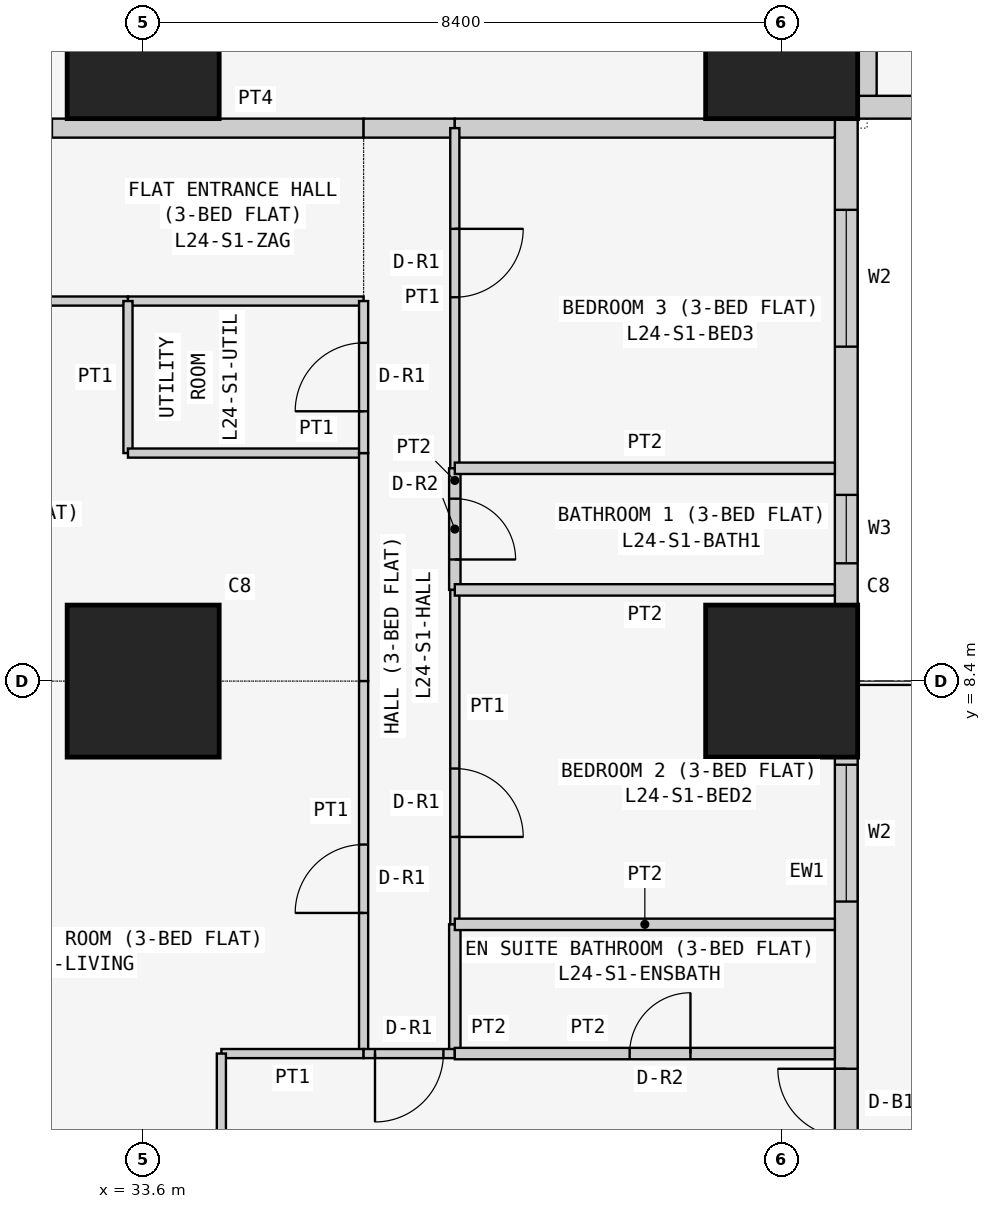
"""IFC4 building model, lengths in metres.
Left out: names, types, materials, properties, quantities, classifications, styles, units other than length and angle.
Written with IfcOpenShell. Run it as: python <this file> out.ifc"""

import sys

from ifc_helpers import new_model, si_unit, direction, frame, frame_2d, origin, origin_2d, place, context, subcontext, project, spatial, rectangle, extrude, element, fill, save


model = new_model("IFC4")
c1 = context("Model", 3, precision=1e-05, world=origin(), true_north=direction((0.0, 1.0)))
c2 = subcontext(c1, "Body", "Model", "MODEL_VIEW")
j1 = project(units=[si_unit("LENGTHUNIT", "METRE"), si_unit("PLANEANGLEUNIT", "RADIAN")], contexts=[c1])
p1 = place(None, origin())
s1 = spatial("IfcSite", under=j1, at=p1, CompositionType="ELEMENT")
p2 = place(p1, origin())
s2 = spatial("IfcBuilding", under=s1, at=p2, CompositionType="ELEMENT")
p3 = place(p2, frame((0.0, 0.0, 95.7)))
s3 = spatial("IfcBuildingStorey", under=s2, at=p3, CompositionType="ELEMENT", Elevation=95.7)
for number, where, z_axis, x_axis in (
    (1, (33.6, 8.4, 0.0), (0.0, 0.0, 1.0), (1.0, 0.0, 0.0)),
    (2, (33.6, 16.8, 0.0), (0.0, 0.0, 1.0), (1.0, 0.0, 0.0)),
    (3, (42.0, 8.4, 0.0), (0.0, 0.0, 1.0), (1.0, 0.0, 0.0)),
    (4, (42.0, 16.8, 0.0), (0.0, 0.0, 1.0), (1.0, 0.0, 0.0)),
):
    element("IfcColumn", number, at=place(p3, frame(where, z_axis=z_axis, x_axis=x_axis)), inside=s3, PredefinedType="COLUMN", context=c2, shape_type="SweptSolid", body=[
        extrude(rectangle(XDim=2.0, YDim=2.0, at=origin_2d()), origin(), (0.0, 0.0, 1.0), 3.6),
    ])
p4 = place(p3, frame((42.85, 0.4, 0.0), z_axis=(0.0, 0.0, 1.0), x_axis=(0.0, 1.0, 0.0)))
e5 = element("IfcWall", 5, at=p4, inside=s3, PredefinedType="SOLIDWALL", context=c2, shape_type="SweptSolid", body=[
    extrude(rectangle(XDim=15.7, YDim=0.3, at=frame_2d((7.85, 0.0))), origin(), (0.0, 0.0, 1.0), 3.45),
])
p5 = place(p4, frame((12.4, 0.0, 0.9)))
e6 = element("IfcOpeningElement", 6, at=p5, cuts=e5, PredefinedType="OPENING", context=c2, shape_type="SweptSolid", body=[
    extrude(rectangle(XDim=1.8, YDim=1.5, at=frame_2d((0.9, 0.75))), frame((0.0, 0.16, 0.0), z_axis=(0.0, -1.0, 0.0), x_axis=(1.0, 0.0, 0.0)), (0.0, 0.0, 1.0), 0.32),
])
p6 = place(p4, frame((9.55, 0.0, 1.5)))
e7 = element("IfcOpeningElement", 7, at=p6, cuts=e5, PredefinedType="OPENING", context=c2, shape_type="SweptSolid", body=[
    extrude(rectangle(XDim=0.9, YDim=0.7, at=frame_2d((0.45, 0.35))), frame((0.0, 0.16, 0.0), z_axis=(0.0, -1.0, 0.0), x_axis=(1.0, 0.0, 0.0)), (0.0, 0.0, 1.0), 0.32),
])
p7 = place(p4, frame((5.1, 0.0, 0.9)))
e8 = element("IfcOpeningElement", 8, at=p7, cuts=e5, PredefinedType="OPENING", context=c2, shape_type="SweptSolid", body=[
    extrude(rectangle(XDim=1.8, YDim=1.5, at=frame_2d((0.9, 0.75))), frame((0.0, 0.16, 0.0), z_axis=(0.0, -1.0, 0.0), x_axis=(1.0, 0.0, 0.0)), (0.0, 0.0, 1.0), 0.32),
])
p8 = place(p4, frame((2.0, 0.0, 0.0)))
e9 = element("IfcOpeningElement", 9, at=p8, cuts=e5, PredefinedType="OPENING", context=c2, shape_type="SweptSolid", body=[
    extrude(rectangle(XDim=0.9, YDim=2.4, at=frame_2d((0.45, 1.2))), frame((0.0, 0.16, 0.0), z_axis=(0.0, -1.0, 0.0), x_axis=(1.0, 0.0, 0.0)), (0.0, 0.0, 1.0), 0.32),
])
p9 = place(p4, frame((0.7, 0.0, 0.9)))
e10 = element("IfcOpeningElement", 10, at=p9, cuts=e5, PredefinedType="OPENING", context=c2, shape_type="SweptSolid", body=[
    extrude(rectangle(XDim=1.2, YDim=1.5, at=frame_2d((0.6, 0.75))), frame((0.0, 0.16, 0.0), z_axis=(0.0, -1.0, 0.0), x_axis=(1.0, 0.0, 0.0)), (0.0, 0.0, 1.0), 0.32),
])
p10 = place(p3, frame((43.0, 15.95, 0.0), z_axis=(0.0, 0.0, 1.0), x_axis=(1.0, 0.0, 0.0)))
e11 = element("IfcWall", 11, at=p10, inside=s3, PredefinedType="SOLIDWALL", context=c2, shape_type="SweptSolid", body=[
    extrude(rectangle(XDim=15.4, YDim=0.3, at=frame_2d((7.7, 0.0))), origin(), (0.0, 0.0, 1.0), 3.45),
])
p11 = place(p10, frame((1.2, 0.0, 0.9)))
e12 = element("IfcOpeningElement", 12, at=p11, cuts=e11, PredefinedType="OPENING", context=c2, shape_type="SweptSolid", body=[
    extrude(rectangle(XDim=1.8, YDim=1.5, at=frame_2d((0.9, 0.75))), frame((0.0, 0.16, 0.0), z_axis=(0.0, -1.0, 0.0), x_axis=(1.0, 0.0, 0.0)), (0.0, 0.0, 1.0), 0.32),
])
p12 = place(p10, frame((4.95, 0.0, 1.5)))
e13 = element("IfcOpeningElement", 13, at=p12, cuts=e11, PredefinedType="OPENING", context=c2, shape_type="SweptSolid", body=[
    extrude(rectangle(XDim=0.9, YDim=0.7, at=frame_2d((0.45, 0.35))), frame((0.0, 0.16, 0.0), z_axis=(0.0, -1.0, 0.0), x_axis=(1.0, 0.0, 0.0)), (0.0, 0.0, 1.0), 0.32),
])
p13 = place(p10, frame((8.5, 0.0, 0.9)))
e14 = element("IfcOpeningElement", 14, at=p13, cuts=e11, PredefinedType="OPENING", context=c2, shape_type="SweptSolid", body=[
    extrude(rectangle(XDim=1.8, YDim=1.5, at=frame_2d((0.9, 0.75))), frame((0.0, 0.16, 0.0), z_axis=(0.0, -1.0, 0.0), x_axis=(1.0, 0.0, 0.0)), (0.0, 0.0, 1.0), 0.32),
])
p14 = place(p10, frame((12.5, 0.0, 0.0)))
e15 = element("IfcOpeningElement", 15, at=p14, cuts=e11, PredefinedType="OPENING", context=c2, shape_type="SweptSolid", body=[
    extrude(rectangle(XDim=0.9, YDim=2.4, at=frame_2d((0.45, 1.2))), frame((0.0, 0.16, 0.0), z_axis=(0.0, -1.0, 0.0), x_axis=(1.0, 0.0, 0.0)), (0.0, 0.0, 1.0), 0.32),
])
p15 = place(p10, frame((13.5, 0.0, 0.9)))
e16 = element("IfcOpeningElement", 16, at=p15, cuts=e11, PredefinedType="OPENING", context=c2, shape_type="SweptSolid", body=[
    extrude(rectangle(XDim=1.2, YDim=1.5, at=frame_2d((0.6, 0.75))), frame((0.0, 0.16, 0.0), z_axis=(0.0, -1.0, 0.0), x_axis=(1.0, 0.0, 0.0)), (0.0, 0.0, 1.0), 0.32),
])
p16 = place(p3, frame((43.125, 21.1, 0.0), z_axis=(0.0, 0.0, 1.0), x_axis=(0.0, -1.0, 0.0)))
e17 = element("IfcWall", 17, at=p16, inside=s3, PredefinedType="PARTITIONING", context=c2, shape_type="SweptSolid", body=[
    extrude(rectangle(XDim=5.0, YDim=0.25, at=frame_2d((2.5, 0.0))), origin(), (0.0, 0.0, 1.0), 3.45),
])
p17 = place(p3, frame((36.5, 15.675, 0.0), z_axis=(0.0, 0.0, 1.0), x_axis=(-1.0, 0.0, 0.0)))
e18 = element("IfcWall", 18, at=p17, inside=s3, PredefinedType="PARTITIONING", context=c2, shape_type="SweptSolid", body=[
    extrude(rectangle(XDim=7.1, YDim=0.25, at=frame_2d((3.55, 0.0))), origin(), (0.0, 0.0, 1.0), 3.45),
])
p18 = place(p17, frame((4.1, 0.0, 0.0)))
e19 = element("IfcOpeningElement", 19, at=p18, cuts=e18, PredefinedType="OPENING", context=c2, shape_type="SweptSolid", body=[
    extrude(rectangle(XDim=1.0, YDim=2.1, at=frame_2d((0.5, 1.05))), frame((0.0, 0.135, 0.0), z_axis=(0.0, -1.0, 0.0), x_axis=(1.0, 0.0, 0.0)), (0.0, 0.0, 1.0), 0.27),
])
p19 = place(p3, frame((37.7, 15.675, 0.0), z_axis=(0.0, 0.0, 1.0), x_axis=(-1.0, 0.0, 0.0)))
e20 = element("IfcWall", 20, at=p19, inside=s3, PredefinedType="PARTITIONING", context=c2, shape_type="SweptSolid", body=[
    extrude(rectangle(XDim=1.2, YDim=0.25, at=frame_2d((0.6, 0.0))), origin(), (0.0, 0.0, 1.0), 3.45),
])
p20 = place(p3, frame((42.7, 15.675, 0.0), z_axis=(0.0, 0.0, 1.0), x_axis=(-1.0, 0.0, 0.0)))
e21 = element("IfcWall", 21, at=p20, inside=s3, PredefinedType="PARTITIONING", context=c2, shape_type="SweptSolid", body=[
    extrude(rectangle(XDim=5.0, YDim=0.25, at=frame_2d((2.5, 0.0))), origin(), (0.0, 0.0, 1.0), 3.45),
])
p21 = place(p3, frame((29.4, 13.4, 0.0), z_axis=(0.0, 0.0, 1.0), x_axis=(1.0, 0.0, 0.0)))
e22 = element("IfcWall", 22, at=p21, inside=s3, PredefinedType="PARTITIONING", context=c2, shape_type="SweptSolid", body=[
    extrude(rectangle(XDim=4.0, YDim=0.12, at=frame_2d((2.0, 0.0))), origin(), (0.0, 0.0, 1.0), 3.45),
])
p22 = place(p21, frame((1.05, 0.0, 0.0)))
e23 = element("IfcOpeningElement", 23, at=p22, cuts=e22, PredefinedType="OPENING", context=c2, shape_type="SweptSolid", body=[
    extrude(rectangle(XDim=0.9, YDim=2.1, at=frame_2d((0.45, 1.05))), frame((0.0, 0.07, 0.0), z_axis=(0.0, -1.0, 0.0), x_axis=(1.0, 0.0, 0.0)), (0.0, 0.0, 1.0), 0.14),
])
p23 = place(p3, frame((33.4, 13.4, 0.0), z_axis=(0.0, 0.0, 1.0), x_axis=(1.0, 0.0, 0.0)))
e24 = element("IfcWall", 24, at=p23, inside=s3, PredefinedType="PARTITIONING", context=c2, shape_type="SweptSolid", body=[
    extrude(rectangle(XDim=3.1, YDim=0.12, at=frame_2d((1.55, 0.0))), origin(), (0.0, 0.0, 1.0), 3.45),
])
p24 = place(p3, frame((33.4, 13.4, 0.0), z_axis=(0.0, 0.0, 1.0), x_axis=(0.0, -1.0, 0.0)))
e25 = element("IfcWall", 25, at=p24, inside=s3, PredefinedType="PARTITIONING", context=c2, shape_type="SweptSolid", body=[
    extrude(rectangle(XDim=2.0, YDim=0.12, at=frame_2d((1.0, 0.0))), origin(), (0.0, 0.0, 1.0), 3.45),
])
p25 = place(p3, frame((33.4, 11.4, 0.0), z_axis=(0.0, 0.0, 1.0), x_axis=(1.0, 0.0, 0.0)))
e26 = element("IfcWall", 26, at=p25, inside=s3, PredefinedType="PARTITIONING", context=c2, shape_type="SweptSolid", body=[
    extrude(rectangle(XDim=3.1, YDim=0.12, at=frame_2d((1.55, 0.0))), origin(), (0.0, 0.0, 1.0), 3.45),
])
p26 = place(p3, frame((36.5, 11.4, 0.0), z_axis=(0.0, 0.0, 1.0), x_axis=(0.0, -1.0, 0.0)))
e27 = element("IfcWall", 27, at=p26, inside=s3, PredefinedType="PARTITIONING", context=c2, shape_type="SweptSolid", body=[
    extrude(rectangle(XDim=3.0, YDim=0.12, at=frame_2d((1.5, 0.0))), origin(), (0.0, 0.0, 1.0), 3.45),
])
p27 = place(p3, frame((36.5, 11.4, 0.0), z_axis=(0.0, 0.0, 1.0), x_axis=(0.0, 1.0, 0.0)))
e28 = element("IfcWall", 28, at=p27, inside=s3, PredefinedType="PARTITIONING", context=c2, shape_type="SweptSolid", body=[
    extrude(rectangle(XDim=2.0, YDim=0.12, at=frame_2d((1.0, 0.0))), origin(), (0.0, 0.0, 1.0), 3.45),
])
p28 = place(p27, frame((0.55, 0.0, 0.0)))
e29 = element("IfcOpeningElement", 29, at=p28, cuts=e28, PredefinedType="OPENING", context=c2, shape_type="SweptSolid", body=[
    extrude(rectangle(XDim=0.9, YDim=2.1, at=frame_2d((0.45, 1.05))), frame((0.0, 0.07, 0.0), z_axis=(0.0, -1.0, 0.0), x_axis=(1.0, 0.0, 0.0)), (0.0, 0.0, 1.0), 0.14),
])
p29 = place(p3, frame((36.5, 8.4, 0.0), z_axis=(0.0, 0.0, 1.0), x_axis=(0.0, -1.0, 0.0)))
e30 = element("IfcWall", 30, at=p29, inside=s3, PredefinedType="PARTITIONING", context=c2, shape_type="SweptSolid", body=[
    extrude(rectangle(XDim=4.9, YDim=0.12, at=frame_2d((2.45, 0.0))), origin(), (0.0, 0.0, 1.0), 3.45),
])
p30 = place(p29, frame((2.15, 0.0, 0.0)))
e31 = element("IfcOpeningElement", 31, at=p30, cuts=e30, PredefinedType="OPENING", context=c2, shape_type="SweptSolid", body=[
    extrude(rectangle(XDim=0.9, YDim=2.1, at=frame_2d((0.45, 1.05))), frame((0.0, 0.07, 0.0), z_axis=(0.0, -1.0, 0.0), x_axis=(1.0, 0.0, 0.0)), (0.0, 0.0, 1.0), 0.14),
])
p31 = place(p3, frame((36.5, 3.5, 0.0), z_axis=(0.0, 0.0, 1.0), x_axis=(-1.0, 0.0, 0.0)))
e32 = element("IfcWall", 32, at=p31, inside=s3, PredefinedType="PARTITIONING", context=c2, shape_type="SweptSolid", body=[
    extrude(rectangle(XDim=1.871, YDim=0.12, at=frame_2d((0.936, 0.0))), origin(), (0.0, 0.0, 1.0), 3.45),
])
p32 = place(p3, frame((34.629, 3.5, 0.0), z_axis=(0.0, 0.0, 1.0), x_axis=(0.0, -1.0, 0.0)))
e33 = element("IfcWall", 33, at=p32, inside=s3, PredefinedType="PARTITIONING", context=c2, shape_type="SweptSolid", body=[
    extrude(rectangle(XDim=4.15, YDim=0.12, at=frame_2d((2.075, 0.0))), origin(), (0.0, 0.0, 1.0), 3.45),
])
p33 = place(p3, frame((37.7, 11.2, 0.0), z_axis=(0.0, 0.0, 1.0), x_axis=(0.0, 1.0, 0.0)))
e34 = element("IfcWall", 34, at=p33, inside=s3, PredefinedType="PARTITIONING", context=c2, shape_type="SweptSolid", body=[
    extrude(rectangle(XDim=4.475, YDim=0.12, at=frame_2d((2.238, 0.0))), origin(), (0.0, 0.0, 1.0), 3.45),
])
p34 = place(p33, frame((2.25, 0.0, 0.0)))
e35 = element("IfcOpeningElement", 35, at=p34, cuts=e34, PredefinedType="OPENING", context=c2, shape_type="SweptSolid", body=[
    extrude(rectangle(XDim=0.9, YDim=2.1, at=frame_2d((0.45, 1.05))), frame((0.0, 0.07, 0.0), z_axis=(0.0, -1.0, 0.0), x_axis=(1.0, 0.0, 0.0)), (0.0, 0.0, 1.0), 0.14),
])
p35 = place(p3, frame((37.7, 9.6, 0.0), z_axis=(0.0, 0.0, 1.0), x_axis=(0.0, 1.0, 0.0)))
e36 = element("IfcWall", 36, at=p35, inside=s3, PredefinedType="PARTITIONING", context=c2, shape_type="SweptSolid", body=[
    extrude(rectangle(XDim=1.6, YDim=0.15, at=frame_2d((0.8, 0.0))), origin(), (0.0, 0.0, 1.0), 3.45),
])
p36 = place(p35, frame((0.4, 0.0, 0.0)))
e37 = element("IfcOpeningElement", 37, at=p36, cuts=e36, PredefinedType="OPENING", context=c2, shape_type="SweptSolid", body=[
    extrude(rectangle(XDim=0.8, YDim=2.1, at=frame_2d((0.4, 1.05))), frame((0.0, 0.085, 0.0), z_axis=(0.0, -1.0, 0.0), x_axis=(1.0, 0.0, 0.0)), (0.0, 0.0, 1.0), 0.17),
])
p37 = place(p3, frame((37.7, 5.2, 0.0), z_axis=(0.0, 0.0, 1.0), x_axis=(0.0, 1.0, 0.0)))
e38 = element("IfcWall", 38, at=p37, inside=s3, PredefinedType="PARTITIONING", context=c2, shape_type="SweptSolid", body=[
    extrude(rectangle(XDim=4.4, YDim=0.12, at=frame_2d((2.2, 0.0))), origin(), (0.0, 0.0, 1.0), 3.45),
])
p38 = place(p37, frame((1.15, 0.0, 0.0)))
e39 = element("IfcOpeningElement", 39, at=p38, cuts=e38, PredefinedType="OPENING", context=c2, shape_type="SweptSolid", body=[
    extrude(rectangle(XDim=0.9, YDim=2.1, at=frame_2d((0.45, 1.05))), frame((0.0, 0.07, 0.0), z_axis=(0.0, -1.0, 0.0), x_axis=(1.0, 0.0, 0.0)), (0.0, 0.0, 1.0), 0.14),
])
p39 = place(p3, frame((37.7, 3.5, 0.0), z_axis=(0.0, 0.0, 1.0), x_axis=(0.0, 1.0, 0.0)))
e40 = element("IfcWall", 40, at=p39, inside=s3, PredefinedType="PARTITIONING", context=c2, shape_type="SweptSolid", body=[
    extrude(rectangle(XDim=1.7, YDim=0.15, at=frame_2d((0.85, 0.0))), origin(), (0.0, 0.0, 1.0), 3.45),
])
p40 = place(p3, frame((36.5, 3.5, 0.0), z_axis=(0.0, 0.0, 1.0), x_axis=(1.0, 0.0, 0.0)))
e41 = element("IfcWall", 41, at=p40, inside=s3, PredefinedType="PARTITIONING", context=c2, shape_type="SweptSolid", body=[
    extrude(rectangle(XDim=1.2, YDim=0.12, at=frame_2d((0.6, 0.0))), origin(), (0.0, 0.0, 1.0), 3.45),
])
p41 = place(p40, frame((0.15, 0.0, 0.0)))
e42 = element("IfcOpeningElement", 42, at=p41, cuts=e41, PredefinedType="OPENING", context=c2, shape_type="SweptSolid", body=[
    extrude(rectangle(XDim=0.9, YDim=2.1, at=frame_2d((0.45, 1.05))), frame((0.0, 0.07, 0.0), z_axis=(0.0, -1.0, 0.0), x_axis=(1.0, 0.0, 0.0)), (0.0, 0.0, 1.0), 0.14),
])
for number, where, z_axis, x_axis in (
    (43, (37.7, 11.2, 0.0), (0.0, 0.0, 1.0), (1.0, 0.0, 0.0)),
    (44, (37.7, 9.6, 0.0), (0.0, 0.0, 1.0), (1.0, 0.0, 0.0)),
    (45, (37.7, 5.2, 0.0), (0.0, 0.0, 1.0), (1.0, 0.0, 0.0)),
):
    element("IfcWall", number, at=place(p3, frame(where, z_axis=z_axis, x_axis=x_axis)), inside=s3, PredefinedType="PARTITIONING", context=c2, shape_type="SweptSolid", body=[
        extrude(rectangle(XDim=5.0, YDim=0.15, at=frame_2d((2.5, 0.0))), origin(), (0.0, 0.0, 1.0), 3.45),
    ])
p42 = place(p3, frame((37.7, 3.5, 0.0), z_axis=(0.0, 0.0, 1.0), x_axis=(1.0, 0.0, 0.0)))
e46 = element("IfcWall", 46, at=p42, inside=s3, PredefinedType="PARTITIONING", context=c2, shape_type="SweptSolid", body=[
    extrude(rectangle(XDim=5.0, YDim=0.15, at=frame_2d((2.5, 0.0))), origin(), (0.0, 0.0, 1.0), 3.45),
])
p43 = place(p42, frame((2.3, 0.0, 0.0)))
e47 = element("IfcOpeningElement", 47, at=p43, cuts=e46, PredefinedType="OPENING", context=c2, shape_type="SweptSolid", body=[
    extrude(rectangle(XDim=0.8, YDim=2.1, at=frame_2d((0.4, 1.05))), frame((0.0, 0.085, 0.0), z_axis=(0.0, -1.0, 0.0), x_axis=(1.0, 0.0, 0.0)), (0.0, 0.0, 1.0), 0.17),
])
p44 = place(p5, origin())
e48 = element("IfcWindow", 48, at=p44, inside=s3, PartitioningType="SINGLE_PANEL", PredefinedType="WINDOW", context=c2, shape_type="SweptSolid", body=[
    extrude(rectangle(XDim=1.8, YDim=1.5, at=frame_2d((0.9, 0.75))), frame((0.0, 0.03, 0.0), z_axis=(0.0, -1.0, 0.0), x_axis=(1.0, 0.0, 0.0)), (0.0, 0.0, 1.0), 0.06),
])
fill(e6, e48)
p45 = place(p6, origin())
e49 = element("IfcWindow", 49, at=p45, inside=s3, PartitioningType="SINGLE_PANEL", PredefinedType="WINDOW", context=c2, shape_type="SweptSolid", body=[
    extrude(rectangle(XDim=0.9, YDim=0.7, at=frame_2d((0.45, 0.35))), frame((0.0, 0.03, 0.0), z_axis=(0.0, -1.0, 0.0), x_axis=(1.0, 0.0, 0.0)), (0.0, 0.0, 1.0), 0.06),
])
fill(e7, e49)
p46 = place(p7, origin())
e50 = element("IfcWindow", 50, at=p46, inside=s3, PartitioningType="SINGLE_PANEL", PredefinedType="WINDOW", context=c2, shape_type="SweptSolid", body=[
    extrude(rectangle(XDim=1.8, YDim=1.5, at=frame_2d((0.9, 0.75))), frame((0.0, 0.03, 0.0), z_axis=(0.0, -1.0, 0.0), x_axis=(1.0, 0.0, 0.0)), (0.0, 0.0, 1.0), 0.06),
])
fill(e8, e50)
p47 = place(p8, origin())
e51 = element("IfcDoor", 51, at=p47, inside=s3, OperationType="SINGLE_SWING_RIGHT", PredefinedType="DOOR", context=c2, shape_type="SweptSolid", body=[
    extrude(rectangle(XDim=0.9, YDim=2.4, at=frame_2d((0.45, 1.2))), frame((0.0, 0.025, 0.0), z_axis=(0.0, -1.0, 0.0), x_axis=(1.0, 0.0, 0.0)), (0.0, 0.0, 1.0), 0.05),
])
fill(e9, e51)
p48 = place(p28, origin())
e52 = element("IfcDoor", 52, at=p48, inside=s3, OperationType="SINGLE_SWING_LEFT", PredefinedType="DOOR", context=c2, shape_type="SweptSolid", body=[
    extrude(rectangle(XDim=0.9, YDim=2.1, at=frame_2d((0.45, 1.05))), frame((0.0, 0.025, 0.0), z_axis=(0.0, -1.0, 0.0), x_axis=(1.0, 0.0, 0.0)), (0.0, 0.0, 1.0), 0.05),
])
fill(e29, e52)
p49 = place(p30, frame((0.9, 0.0, 0.0), z_axis=(0.0, 0.0, 1.0), x_axis=(-1.0, 0.0, 0.0)))
e53 = element("IfcDoor", 53, at=p49, inside=s3, OperationType="SINGLE_SWING_LEFT", PredefinedType="DOOR", context=c2, shape_type="SweptSolid", body=[
    extrude(rectangle(XDim=0.9, YDim=2.1, at=frame_2d((0.45, 1.05))), frame((0.0, 0.025, 0.0), z_axis=(0.0, -1.0, 0.0), x_axis=(1.0, 0.0, 0.0)), (0.0, 0.0, 1.0), 0.05),
])
fill(e31, e53)
p50 = place(p34, frame((0.9, 0.0, 0.0), z_axis=(0.0, 0.0, 1.0), x_axis=(-1.0, 0.0, 0.0)))
e54 = element("IfcDoor", 54, at=p50, inside=s3, OperationType="SINGLE_SWING_LEFT", PredefinedType="DOOR", context=c2, shape_type="SweptSolid", body=[
    extrude(rectangle(XDim=0.9, YDim=2.1, at=frame_2d((0.45, 1.05))), frame((0.0, 0.025, 0.0), z_axis=(0.0, -1.0, 0.0), x_axis=(1.0, 0.0, 0.0)), (0.0, 0.0, 1.0), 0.05),
])
fill(e35, e54)
p51 = place(p36, frame((0.8, 0.0, 0.0), z_axis=(0.0, 0.0, 1.0), x_axis=(-1.0, 0.0, 0.0)))
e55 = element("IfcDoor", 55, at=p51, inside=s3, OperationType="SINGLE_SWING_RIGHT", PredefinedType="DOOR", context=c2, shape_type="SweptSolid", body=[
    extrude(rectangle(XDim=0.8, YDim=2.1, at=frame_2d((0.4, 1.05))), frame((0.0, 0.025, 0.0), z_axis=(0.0, -1.0, 0.0), x_axis=(1.0, 0.0, 0.0)), (0.0, 0.0, 1.0), 0.05),
])
fill(e37, e55)
p52 = place(p38, frame((0.9, 0.0, 0.0), z_axis=(0.0, 0.0, 1.0), x_axis=(-1.0, 0.0, 0.0)))
e56 = element("IfcDoor", 56, at=p52, inside=s3, OperationType="SINGLE_SWING_RIGHT", PredefinedType="DOOR", context=c2, shape_type="SweptSolid", body=[
    extrude(rectangle(XDim=0.9, YDim=2.1, at=frame_2d((0.45, 1.05))), frame((0.0, 0.025, 0.0), z_axis=(0.0, -1.0, 0.0), x_axis=(1.0, 0.0, 0.0)), (0.0, 0.0, 1.0), 0.05),
])
fill(e39, e56)
p53 = place(p41, frame((0.9, 0.0, 0.0), z_axis=(0.0, 0.0, 1.0), x_axis=(-1.0, 0.0, 0.0)))
e57 = element("IfcDoor", 57, at=p53, inside=s3, OperationType="SINGLE_SWING_RIGHT", PredefinedType="DOOR", context=c2, shape_type="SweptSolid", body=[
    extrude(rectangle(XDim=0.9, YDim=2.1, at=frame_2d((0.45, 1.05))), frame((0.0, 0.025, 0.0), z_axis=(0.0, -1.0, 0.0), x_axis=(1.0, 0.0, 0.0)), (0.0, 0.0, 1.0), 0.05),
])
fill(e42, e57)
p54 = place(p43, origin())
e58 = element("IfcDoor", 58, at=p54, inside=s3, OperationType="SINGLE_SWING_RIGHT", PredefinedType="DOOR", context=c2, shape_type="SweptSolid", body=[
    extrude(rectangle(XDim=0.8, YDim=2.1, at=frame_2d((0.4, 1.05))), frame((0.0, 0.025, 0.0), z_axis=(0.0, -1.0, 0.0), x_axis=(1.0, 0.0, 0.0)), (0.0, 0.0, 1.0), 0.05),
])
fill(e47, e58)
save(model, sys.argv[1])
